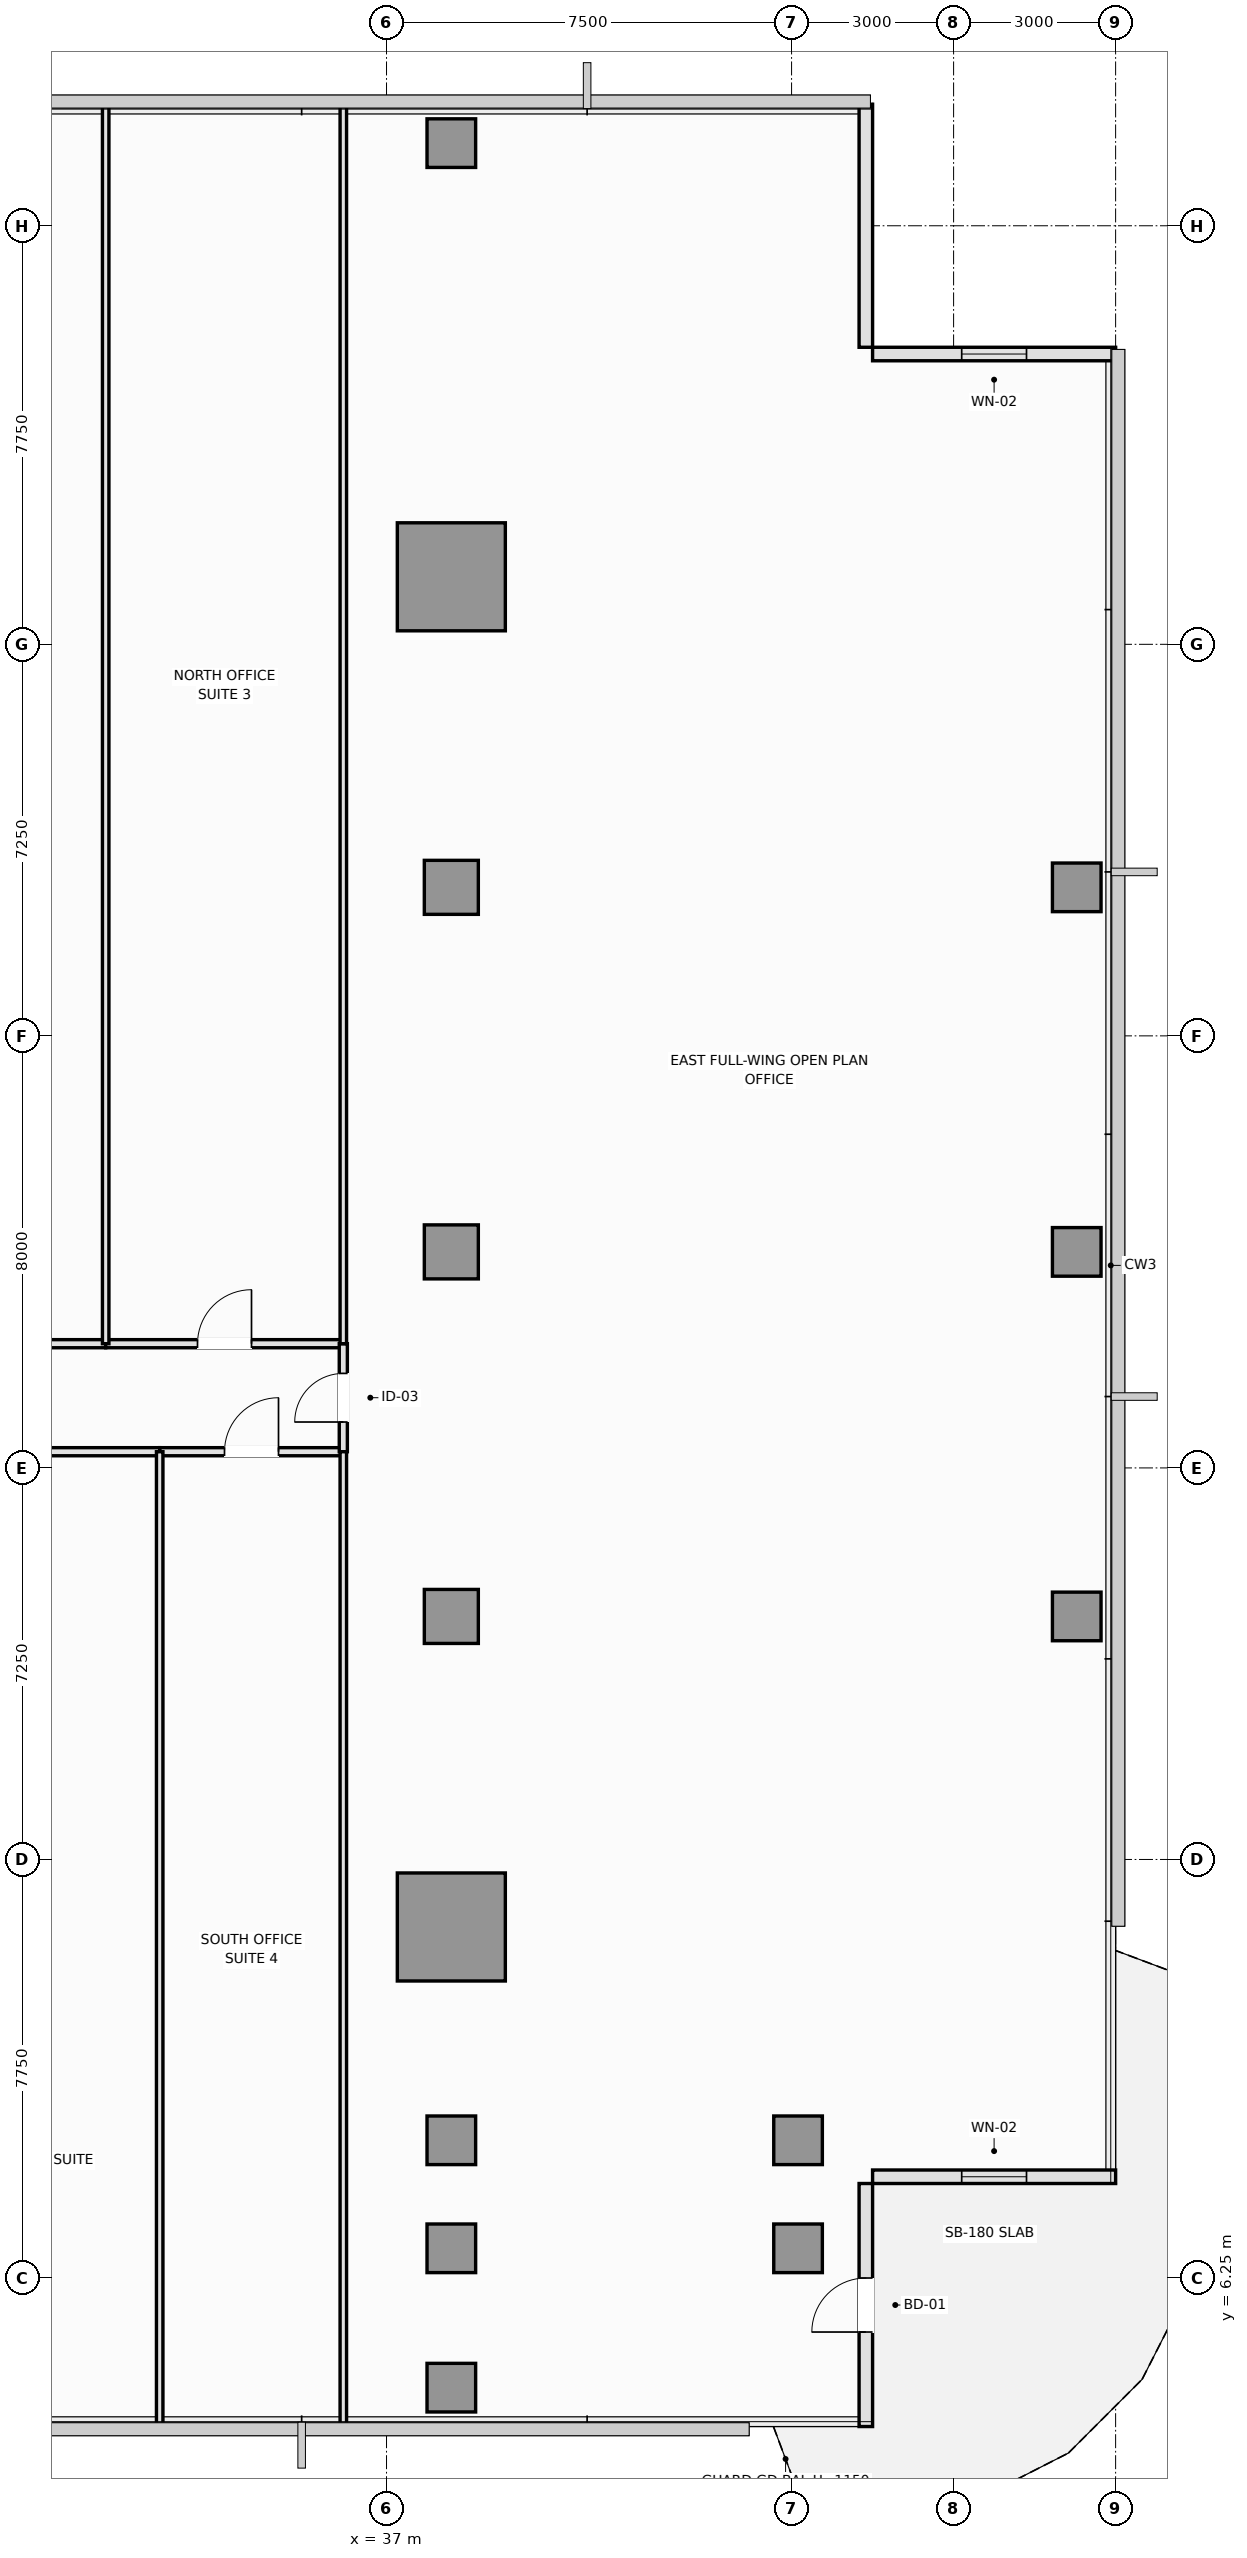
"""IFC4 building model, lengths in metres.
Left out: names, types, materials, properties, quantities, classifications, styles, units other than length and angle.
Written with IfcOpenShell. Run it as: python <this file> out.ifc"""

import sys

from ifc_helpers import new_model, si_unit, direction, frame, frame_2d, origin, origin_2d, place, context, subcontext, project, spatial, rectangle, extrude, element, fill, save


model = new_model("IFC4")
c1 = context("Model", 3, precision=1e-05, world=origin(), true_north=direction((0.0, 1.0)))
c2 = subcontext(c1, "Body", "Model", "MODEL_VIEW")
j1 = project(units=[si_unit("LENGTHUNIT", "METRE"), si_unit("PLANEANGLEUNIT", "RADIAN")], contexts=[c1])
p1 = place(None, origin())
s1 = spatial("IfcSite", under=j1, at=p1, CompositionType="ELEMENT")
p2 = place(p1, origin())
s2 = spatial("IfcBuilding", under=s1, at=p2, CompositionType="ELEMENT")
p3 = place(p2, frame((0.0, 0.0, 127.1)))
s3 = spatial("IfcBuildingStorey", under=s2, at=p3, CompositionType="ELEMENT", Elevation=127.1)
for number, where, z_axis, x_axis in (
    (1, (38.2, 12.75, 0.0), (0.0, 0.0, 1.0), (1.0, 0.0, 0.0)),
    (2, (38.2, 37.75, 0.0), (0.0, 0.0, 1.0), (1.0, 0.0, 0.0)),
):
    element("IfcColumn", number, at=place(p3, frame(where, z_axis=z_axis, x_axis=x_axis)), inside=s3, PredefinedType="COLUMN", context=c2, shape_type="SweptSolid", body=[
        extrude(rectangle(XDim=2.0, YDim=2.0, at=origin_2d()), origin(), (0.0, 0.0, 1.0), 3.55),
    ])
for number, where, z_axis, x_axis in (
    (3, (38.2, 18.5, 0.0), (0.0, 0.0, 1.0), (1.0, 0.0, 0.0)),
    (4, (38.2, 25.25, 0.0), (0.0, 0.0, 1.0), (1.0, 0.0, 0.0)),
    (5, (38.2, 32.0, 0.0), (0.0, 0.0, 1.0), (1.0, 0.0, 0.0)),
):
    element("IfcColumn", number, at=place(p3, frame(where, z_axis=z_axis, x_axis=x_axis)), inside=s3, PredefinedType="COLUMN", context=c2, shape_type="SweptSolid", body=[
        extrude(rectangle(XDim=1.0, YDim=1.0, at=origin_2d()), origin(), (0.0, 0.0, 1.0), 3.55),
    ])
for number, where, z_axis, x_axis in (
    (6, (38.2, 6.8, 0.0), (0.0, 0.0, 1.0), (1.0, 0.0, 0.0)),
    (7, (38.2, 8.8, 0.0), (0.0, 0.0, 1.0), (1.0, 0.0, 0.0)),
    (8, (44.62, 6.8, 0.0), (0.0, 0.0, 1.0), (1.0, 0.0, 0.0)),
    (9, (44.62, 8.8, 0.0), (0.0, 0.0, 1.0), (1.0, 0.0, 0.0)),
    (10, (49.78, 18.5, 0.0), (0.0, 0.0, 1.0), (1.0, 0.0, 0.0)),
    (11, (49.78, 25.25, 0.0), (0.0, 0.0, 1.0), (1.0, 0.0, 0.0)),
    (12, (49.78, 32.0, 0.0), (0.0, 0.0, 1.0), (1.0, 0.0, 0.0)),
    (13, (38.2, 4.22, 0.0), (0.0, 0.0, 1.0), (1.0, 0.0, 0.0)),
    (14, (38.2, 45.78, 0.0), (0.0, 0.0, 1.0), (1.0, 0.0, 0.0)),
):
    element("IfcColumn", number, at=place(p3, frame(where, z_axis=z_axis, x_axis=x_axis)), inside=s3, PredefinedType="COLUMN", context=c2, shape_type="SweptSolid", body=[
        extrude(rectangle(XDim=0.9, YDim=0.9, at=origin_2d()), origin(), (0.0, 0.0, 1.0), 3.55),
    ])
p4 = place(p3, frame((45.875, 3.5, 0.0), z_axis=(0.0, 0.0, 1.0), x_axis=(0.0, 1.0, 0.0)))
e15 = element("IfcWall", 15, at=p4, inside=s3, PredefinedType="SOLIDWALL", context=c2, shape_type="SweptSolid", body=[
    extrude(rectangle(XDim=4.5, YDim=0.25, at=frame_2d((2.25, 0.0))), origin(), (0.0, 0.0, 1.0), 3.07),
])
p5 = place(p4, frame((1.75, 0.0, 0.0)))
e16 = element("IfcOpeningElement", 16, at=p5, cuts=e15, PredefinedType="OPENING", context=c2, shape_type="SweptSolid", body=[
    extrude(rectangle(XDim=1.0, YDim=2.2, at=frame_2d((0.5, 1.1))), frame((0.0, 0.135, 0.0), z_axis=(0.0, -1.0, 0.0), x_axis=(1.0, 0.0, 0.0)), (0.0, 0.0, 1.0), 0.27),
])
p6 = place(p3, frame((46.0, 8.125, 0.0), z_axis=(0.0, 0.0, 1.0), x_axis=(1.0, 0.0, 0.0)))
e17 = element("IfcWall", 17, at=p6, inside=s3, PredefinedType="SOLIDWALL", context=c2, shape_type="SweptSolid", body=[
    extrude(rectangle(XDim=4.5, YDim=0.25, at=frame_2d((2.25, 0.0))), origin(), (0.0, 0.0, 1.0), 3.1),
])
p7 = place(p6, frame((1.65, 0.0, 0.9)))
e18 = element("IfcOpeningElement", 18, at=p7, cuts=e17, PredefinedType="OPENING", context=c2, shape_type="SweptSolid", body=[
    extrude(rectangle(XDim=1.2, YDim=1.8, at=frame_2d((0.6, 0.9))), frame((0.0, 0.135, 0.0), z_axis=(0.0, -1.0, 0.0), x_axis=(1.0, 0.0, 0.0)), (0.0, 0.0, 1.0), 0.27),
])
p8 = place(p3, frame((50.5, 41.875, 0.0), z_axis=(0.0, 0.0, 1.0), x_axis=(-1.0, 0.0, 0.0)))
e19 = element("IfcWall", 19, at=p8, inside=s3, PredefinedType="SOLIDWALL", context=c2, shape_type="SweptSolid", body=[
    extrude(rectangle(XDim=4.5, YDim=0.25, at=frame_2d((2.25, 0.0))), origin(), (0.0, 0.0, 1.0), 3.37),
])
p9 = place(p8, frame((1.65, 0.0, 0.9)))
e20 = element("IfcOpeningElement", 20, at=p9, cuts=e19, PredefinedType="OPENING", context=c2, shape_type="SweptSolid", body=[
    extrude(rectangle(XDim=1.2, YDim=1.8, at=frame_2d((0.6, 0.9))), frame((0.0, 0.135, 0.0), z_axis=(0.0, -1.0, 0.0), x_axis=(1.0, 0.0, 0.0)), (0.0, 0.0, 1.0), 0.27),
])
p10 = place(p3, frame((45.875, 42.0, 0.0), z_axis=(0.0, 0.0, 1.0), x_axis=(0.0, 1.0, 0.0)))
e21 = element("IfcWall", 21, at=p10, inside=s3, PredefinedType="SOLIDWALL", context=c2, shape_type="SweptSolid", body=[
    extrude(rectangle(XDim=4.5, YDim=0.25, at=frame_2d((2.25, 0.0))), origin(), (0.0, 0.0, 1.0), 3.37),
])
p11 = place(p3, frame((27.5, 21.55, 0.0), z_axis=(0.0, 0.0, 1.0), x_axis=(1.0, 0.0, 0.0)))
e22 = element("IfcWall", 22, at=p11, inside=s3, PredefinedType="PARTITIONING", context=c2, shape_type="SweptSolid", body=[
    extrude(rectangle(XDim=5.3, YDim=0.15, at=frame_2d((2.65, 0.0))), origin(), (0.0, 0.0, 1.0), 3.37),
])
p12 = place(p11, frame((2.15, 0.0, 0.0)))
e23 = element("IfcOpeningElement", 23, at=p12, cuts=e22, PredefinedType="OPENING", context=c2, shape_type="SweptSolid", body=[
    extrude(rectangle(XDim=1.0, YDim=2.15, at=frame_2d((0.5, 1.075))), frame((0.0, 0.085, 0.0), z_axis=(0.0, -1.0, 0.0), x_axis=(1.0, 0.0, 0.0)), (0.0, 0.0, 1.0), 0.17),
])
p13 = place(p3, frame((32.8, 21.55, 0.0), z_axis=(0.0, 0.0, 1.0), x_axis=(1.0, 0.0, 0.0)))
e24 = element("IfcWall", 24, at=p13, inside=s3, PredefinedType="PARTITIONING", context=c2, shape_type="SweptSolid", body=[
    extrude(rectangle(XDim=3.4, YDim=0.15, at=frame_2d((1.7, 0.0))), origin(), (0.0, 0.0, 1.0), 3.37),
])
p14 = place(p13, frame((1.2, 0.0, 0.0)))
e25 = element("IfcOpeningElement", 25, at=p14, cuts=e24, PredefinedType="OPENING", context=c2, shape_type="SweptSolid", body=[
    extrude(rectangle(XDim=1.0, YDim=2.15, at=frame_2d((0.5, 1.075))), frame((0.0, 0.085, 0.0), z_axis=(0.0, -1.0, 0.0), x_axis=(1.0, 0.0, 0.0)), (0.0, 0.0, 1.0), 0.17),
])
p15 = place(p3, frame((27.5, 23.55, 0.0), z_axis=(0.0, 0.0, 1.0), x_axis=(1.0, 0.0, 0.0)))
e26 = element("IfcWall", 26, at=p15, inside=s3, PredefinedType="PARTITIONING", context=c2, shape_type="SweptSolid", body=[
    extrude(rectangle(XDim=4.3, YDim=0.15, at=frame_2d((2.15, 0.0))), origin(), (0.0, 0.0, 1.0), 3.37),
])
p16 = place(p15, frame((1.65, 0.0, 0.0)))
e27 = element("IfcOpeningElement", 27, at=p16, cuts=e26, PredefinedType="OPENING", context=c2, shape_type="SweptSolid", body=[
    extrude(rectangle(XDim=1.0, YDim=2.15, at=frame_2d((0.5, 1.075))), frame((0.0, 0.085, 0.0), z_axis=(0.0, -1.0, 0.0), x_axis=(1.0, 0.0, 0.0)), (0.0, 0.0, 1.0), 0.17),
])
p17 = place(p3, frame((31.8, 23.55, 0.0), z_axis=(0.0, 0.0, 1.0), x_axis=(1.0, 0.0, 0.0)))
e28 = element("IfcWall", 28, at=p17, inside=s3, PredefinedType="PARTITIONING", context=c2, shape_type="SweptSolid", body=[
    extrude(rectangle(XDim=4.4, YDim=0.15, at=frame_2d((2.2, 0.0))), origin(), (0.0, 0.0, 1.0), 3.37),
])
p18 = place(p17, frame((1.7, 0.0, 0.0)))
e29 = element("IfcOpeningElement", 29, at=p18, cuts=e28, PredefinedType="OPENING", context=c2, shape_type="SweptSolid", body=[
    extrude(rectangle(XDim=1.0, YDim=2.15, at=frame_2d((0.5, 1.075))), frame((0.0, 0.085, 0.0), z_axis=(0.0, -1.0, 0.0), x_axis=(1.0, 0.0, 0.0)), (0.0, 0.0, 1.0), 0.17),
])
p19 = place(p3, frame((36.2, 21.55, 0.0), z_axis=(0.0, 0.0, 1.0), x_axis=(0.0, 1.0, 0.0)))
e30 = element("IfcWall", 30, at=p19, inside=s3, PredefinedType="PARTITIONING", context=c2, shape_type="SweptSolid", body=[
    extrude(rectangle(XDim=2.0, YDim=0.15, at=frame_2d((1.0, 0.0))), origin(), (0.0, 0.0, 1.0), 3.37),
])
p20 = place(p19, frame((0.55, 0.0, 0.0)))
e31 = element("IfcOpeningElement", 31, at=p20, cuts=e30, PredefinedType="OPENING", context=c2, shape_type="SweptSolid", body=[
    extrude(rectangle(XDim=0.9, YDim=2.1, at=frame_2d((0.45, 1.05))), frame((0.0, 0.085, 0.0), z_axis=(0.0, -1.0, 0.0), x_axis=(1.0, 0.0, 0.0)), (0.0, 0.0, 1.0), 0.17),
])
for number, where, z_axis, x_axis in (
    (32, (32.8, 3.51, 0.0), (0.0, 0.0, 1.0), (0.0, 1.0, 0.0)),
    (33, (36.2, 3.51, 0.0), (0.0, 0.0, 1.0), (0.0, 1.0, 0.0)),
):
    element("IfcWall", number, at=place(p3, frame(where, z_axis=z_axis, x_axis=x_axis)), inside=s3, PredefinedType="PARTITIONING", context=c2, shape_type="SweptSolid", body=[
        extrude(rectangle(XDim=18.04, YDim=0.12, at=frame_2d((9.02, 0.0))), origin(), (0.0, 0.0, 1.0), 3.37),
    ])
for number, where, z_axis, x_axis in (
    (34, (31.8, 23.55, 0.0), (0.0, 0.0, 1.0), (0.0, 1.0, 0.0)),
    (35, (36.2, 23.55, 0.0), (0.0, 0.0, 1.0), (0.0, 1.0, 0.0)),
):
    element("IfcWall", number, at=place(p3, frame(where, z_axis=z_axis, x_axis=x_axis)), inside=s3, PredefinedType="PARTITIONING", context=c2, shape_type="SweptSolid", body=[
        extrude(rectangle(XDim=22.94, YDim=0.12, at=frame_2d((11.47, 0.0))), origin(), (0.0, 0.0, 1.0), 3.37),
    ])
p21 = place(p5, frame((1.0, 0.0, 0.0), z_axis=(0.0, 0.0, 1.0), x_axis=(-1.0, 0.0, 0.0)))
e36 = element("IfcDoor", 36, at=p21, inside=s3, OperationType="SINGLE_SWING_LEFT", PredefinedType="DOOR", context=c2, shape_type="SweptSolid", body=[
    extrude(rectangle(XDim=1.0, YDim=2.2, at=frame_2d((0.5, 1.1))), frame((0.0, 0.025, 0.0), z_axis=(0.0, -1.0, 0.0), x_axis=(1.0, 0.0, 0.0)), (0.0, 0.0, 1.0), 0.05),
])
fill(e16, e36)
p22 = place(p7, origin())
e37 = element("IfcWindow", 37, at=p22, inside=s3, PartitioningType="SINGLE_PANEL", PredefinedType="WINDOW", context=c2, shape_type="SweptSolid", body=[
    extrude(rectangle(XDim=1.2, YDim=1.8, at=frame_2d((0.6, 0.9))), frame((0.0, 0.03, 0.0), z_axis=(0.0, -1.0, 0.0), x_axis=(1.0, 0.0, 0.0)), (0.0, 0.0, 1.0), 0.06),
])
fill(e18, e37)
p23 = place(p9, origin())
e38 = element("IfcWindow", 38, at=p23, inside=s3, PartitioningType="SINGLE_PANEL", PredefinedType="WINDOW", context=c2, shape_type="SweptSolid", body=[
    extrude(rectangle(XDim=1.2, YDim=1.8, at=frame_2d((0.6, 0.9))), frame((0.0, 0.03, 0.0), z_axis=(0.0, -1.0, 0.0), x_axis=(1.0, 0.0, 0.0)), (0.0, 0.0, 1.0), 0.06),
])
fill(e20, e38)
p24 = place(p14, origin())
e39 = element("IfcDoor", 39, at=p24, inside=s3, OperationType="SINGLE_SWING_RIGHT", PredefinedType="DOOR", context=c2, shape_type="SweptSolid", body=[
    extrude(rectangle(XDim=1.0, YDim=2.15, at=frame_2d((0.5, 1.075))), frame((0.0, 0.025, 0.0), z_axis=(0.0, -1.0, 0.0), x_axis=(1.0, 0.0, 0.0)), (0.0, 0.0, 1.0), 0.05),
])
fill(e25, e39)
p25 = place(p18, origin())
e40 = element("IfcDoor", 40, at=p25, inside=s3, OperationType="SINGLE_SWING_RIGHT", PredefinedType="DOOR", context=c2, shape_type="SweptSolid", body=[
    extrude(rectangle(XDim=1.0, YDim=2.15, at=frame_2d((0.5, 1.075))), frame((0.0, 0.025, 0.0), z_axis=(0.0, -1.0, 0.0), x_axis=(1.0, 0.0, 0.0)), (0.0, 0.0, 1.0), 0.05),
])
fill(e29, e40)
p26 = place(p20, origin())
e41 = element("IfcDoor", 41, at=p26, inside=s3, OperationType="SINGLE_SWING_LEFT", PredefinedType="DOOR", context=c2, shape_type="SweptSolid", body=[
    extrude(rectangle(XDim=0.9, YDim=2.1, at=frame_2d((0.45, 1.05))), frame((0.0, 0.025, 0.0), z_axis=(0.0, -1.0, 0.0), x_axis=(1.0, 0.0, 0.0)), (0.0, 0.0, 1.0), 0.05),
])
fill(e31, e41)
save(model, sys.argv[1])
